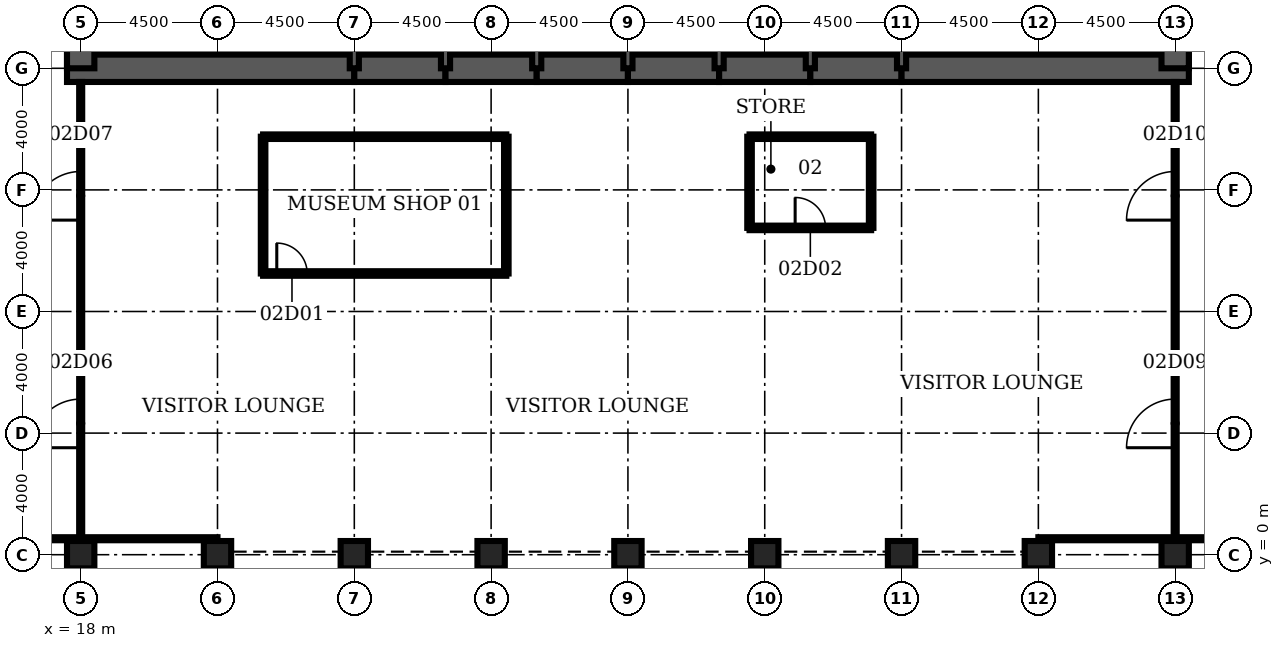
"""IFC4 building model, lengths in metres.
Left out: names, types, materials, properties, quantities, classifications, styles, units other than length and angle.
Written with IfcOpenShell. Run it as: python <this file> out.ifc"""

import sys

from ifc_helpers import new_model, si_unit, direction, frame, frame_2d, origin, origin_2d, place, context, subcontext, project, spatial, rectangle, hollow_rectangle, extrude, element, fill, save


model = new_model("IFC4")
c1 = context("Model", 3, precision=1e-05, world=origin(), true_north=direction((0.0, 1.0)))
c2 = subcontext(c1, "Body", "Model", "MODEL_VIEW")
j1 = project(units=[si_unit("LENGTHUNIT", "METRE"), si_unit("PLANEANGLEUNIT", "RADIAN")], contexts=[c1])
p1 = place(None, origin())
s1 = spatial("IfcSite", under=j1, at=p1, CompositionType="ELEMENT")
p2 = place(p1, origin())
s2 = spatial("IfcBuilding", under=s1, at=p2, CompositionType="ELEMENT")
p3 = place(p2, frame((0.0, 0.0, 13.0)))
s3 = spatial("IfcBuildingStorey", under=s2, at=p3, CompositionType="ELEMENT", Elevation=13.0)
for number, where, z_axis, x_axis in (
    (1, (18.0, 0.0, 0.0), (0.0, 0.0, 1.0), (0.0, 1.0, 0.0)),
    (2, (22.5, 0.0, 0.0), (0.0, 0.0, 1.0), (0.0, 1.0, 0.0)),
    (3, (27.0, 0.0, 0.0), (0.0, 0.0, 1.0), (0.0, 1.0, 0.0)),
    (4, (31.5, 0.0, 0.0), (0.0, 0.0, 1.0), (0.0, 1.0, 0.0)),
    (5, (36.0, 0.0, 0.0), (0.0, 0.0, 1.0), (0.0, 1.0, 0.0)),
    (6, (40.5, 0.0, 0.0), (0.0, 0.0, 1.0), (0.0, 1.0, 0.0)),
    (7, (45.0, 0.0, 0.0), (0.0, 0.0, 1.0), (0.0, 1.0, 0.0)),
    (8, (49.5, 0.0, 0.0), (0.0, 0.0, 1.0), (0.0, 1.0, 0.0)),
    (9, (54.0, 0.0, 0.0), (0.0, 0.0, 1.0), (0.0, 1.0, 0.0)),
):
    element("IfcColumn", number, at=place(p3, frame(where, z_axis=z_axis, x_axis=x_axis)), inside=s3, PredefinedType="COLUMN", context=c2, shape_type="SweptSolid", body=[
        extrude(hollow_rectangle(XDim=0.9, YDim=0.9, WallThickness=0.12, at=origin_2d()), origin(), (0.0, 0.0, 1.0), 5.0),
    ])
p4 = place(p3, frame((17.55, 16.0, 0.0), z_axis=(0.0, 0.0, 1.0), x_axis=(1.0, 0.0, 0.0)))
e10 = element("IfcWall", 10, at=p4, inside=s3, PredefinedType="SHEAR", context=c2, shape_type="SweptSolid", body=[
    extrude(rectangle(XDim=9.45, YDim=0.9, at=frame_2d((4.725, 0.0))), origin(), (0.0, 0.0, 1.0), 5.0),
])
for number, where, z_axis, x_axis in (
    (11, (27.0, 16.0, 0.0), (0.0, 0.0, 1.0), (1.0, 0.0, 0.0)),
    (12, (30.0, 16.0, 0.0), (0.0, 0.0, 1.0), (1.0, 0.0, 0.0)),
    (13, (33.0, 16.0, 0.0), (0.0, 0.0, 1.0), (1.0, 0.0, 0.0)),
    (14, (36.0, 16.0, 0.0), (0.0, 0.0, 1.0), (1.0, 0.0, 0.0)),
    (15, (39.0, 16.0, 0.0), (0.0, 0.0, 1.0), (1.0, 0.0, 0.0)),
    (16, (42.0, 16.0, 0.0), (0.0, 0.0, 1.0), (1.0, 0.0, 0.0)),
):
    element("IfcWall", number, at=place(p3, frame(where, z_axis=z_axis, x_axis=x_axis)), inside=s3, PredefinedType="SHEAR", context=c2, shape_type="SweptSolid", body=[
        extrude(rectangle(XDim=3.0, YDim=0.9, at=frame_2d((1.5, 0.0))), origin(), (0.0, 0.0, 1.0), 5.0),
    ])
p5 = place(p3, frame((45.0, 16.0, 0.0), z_axis=(0.0, 0.0, 1.0), x_axis=(1.0, 0.0, 0.0)))
e17 = element("IfcWall", 17, at=p5, inside=s3, PredefinedType="SHEAR", context=c2, shape_type="SweptSolid", body=[
    extrude(rectangle(XDim=9.45, YDim=0.9, at=frame_2d((4.725, 0.0))), origin(), (0.0, 0.0, 1.0), 5.0),
])
for number, where, z_axis, x_axis in (
    (18, (18.0, 19.2, 0.0), (0.0, 0.0, 1.0), (0.0, -1.0, 0.0)),
    (19, (54.0, 16.0, 0.0), (0.0, 0.0, 1.0), (0.0, 1.0, 0.0)),
):
    element("IfcWall", number, at=place(p3, frame(where, z_axis=z_axis, x_axis=x_axis)), inside=s3, PredefinedType="SHEAR", context=c2, shape_type="SweptSolid", body=[
        extrude(rectangle(XDim=3.2, YDim=0.9, at=frame_2d((1.6, 0.0))), origin(), (0.0, 0.0, 1.0), 5.0),
    ])
for number, where, z_axis, x_axis in (
    (20, (27.0, 16.0, 0.0), (0.0, 0.0, 1.0), (0.0, 1.0, 0.0)),
    (21, (30.0, 16.0, 0.0), (0.0, 0.0, 1.0), (0.0, 1.0, 0.0)),
    (22, (33.0, 16.0, 0.0), (0.0, 0.0, 1.0), (0.0, 1.0, 0.0)),
    (23, (36.0, 16.0, 0.0), (0.0, 0.0, 1.0), (0.0, 1.0, 0.0)),
    (24, (39.0, 16.0, 0.0), (0.0, 0.0, 1.0), (0.0, 1.0, 0.0)),
    (25, (42.0, 16.0, 0.0), (0.0, 0.0, 1.0), (0.0, 1.0, 0.0)),
    (26, (45.0, 16.0, 0.0), (0.0, 0.0, 1.0), (0.0, 1.0, 0.0)),
):
    element("IfcWall", number, at=place(p3, frame(where, z_axis=z_axis, x_axis=x_axis)), inside=s3, PredefinedType="SOLIDWALL", context=c2, shape_type="SweptSolid", body=[
        extrude(rectangle(XDim=3.2, YDim=0.3, at=frame_2d((1.6, 0.0))), origin(), (0.0, 0.0, 1.0), 5.0),
    ])
p6 = place(p3, frame((24.0, 9.25, 0.0), z_axis=(0.0, 0.0, 1.0), x_axis=(1.0, 0.0, 0.0)))
e27 = element("IfcWall", 27, at=p6, inside=s3, PredefinedType="PARTITIONING", context=c2, shape_type="SweptSolid", body=[
    extrude(rectangle(XDim=8.0, YDim=0.15, at=frame_2d((4.0, 0.0))), origin(), (0.0, 0.0, 1.0), 3.0),
])
p7 = place(p6, frame((0.45, 0.0, 0.0)))
e28 = element("IfcOpeningElement", 28, at=p7, cuts=e27, PredefinedType="OPENING", context=c2, shape_type="SweptSolid", body=[
    extrude(rectangle(XDim=1.0, YDim=2.1, at=frame_2d((0.5, 1.05))), frame((0.0, 0.085, 0.0), z_axis=(0.0, -1.0, 0.0), x_axis=(1.0, 0.0, 0.0)), (0.0, 0.0, 1.0), 0.17),
])
p8 = place(p3, frame((40.0, 10.75, 0.0), z_axis=(0.0, 0.0, 1.0), x_axis=(1.0, 0.0, 0.0)))
e29 = element("IfcWall", 29, at=p8, inside=s3, PredefinedType="PARTITIONING", context=c2, shape_type="SweptSolid", body=[
    extrude(rectangle(XDim=4.0, YDim=0.15, at=frame_2d((2.0, 0.0))), origin(), (0.0, 0.0, 1.0), 3.0),
])
p9 = place(p8, frame((1.5, 0.0, 0.0)))
e30 = element("IfcOpeningElement", 30, at=p9, cuts=e29, PredefinedType="OPENING", context=c2, shape_type="SweptSolid", body=[
    extrude(rectangle(XDim=1.0, YDim=2.1, at=frame_2d((0.5, 1.05))), frame((0.0, 0.085, 0.0), z_axis=(0.0, -1.0, 0.0), x_axis=(1.0, 0.0, 0.0)), (0.0, 0.0, 1.0), 0.17),
])
p10 = place(p3, frame((24.0, 13.75, 0.0), z_axis=(0.0, 0.0, 1.0), x_axis=(1.0, 0.0, 0.0)))
e31 = element("IfcWall", 31, at=p10, inside=s3, PredefinedType="PARTITIONING", context=c2, shape_type="SweptSolid", body=[
    extrude(rectangle(XDim=8.0, YDim=0.15, at=frame_2d((4.0, 0.0))), origin(), (0.0, 0.0, 1.0), 3.0),
])
p11 = place(p3, frame((40.0, 13.75, 0.0), z_axis=(0.0, 0.0, 1.0), x_axis=(1.0, 0.0, 0.0)))
e32 = element("IfcWall", 32, at=p11, inside=s3, PredefinedType="PARTITIONING", context=c2, shape_type="SweptSolid", body=[
    extrude(rectangle(XDim=4.0, YDim=0.15, at=frame_2d((2.0, 0.0))), origin(), (0.0, 0.0, 1.0), 3.0),
])
p12 = place(p3, frame((18.0, 0.575, 0.0), z_axis=(0.0, 0.0, 1.0), x_axis=(0.0, 1.0, 0.0)))
e33 = element("IfcWall", 33, at=p12, inside=s3, PredefinedType="PARTITIONING", context=c2, shape_type="SweptSolid", body=[
    extrude(rectangle(XDim=14.975, YDim=0.1, at=frame_2d((7.488, 0.0))), origin(), (0.0, 0.0, 1.0), 3.0),
])
p13 = place(p12, frame((2.944, 0.0, 0.0)))
e34 = element("IfcOpeningElement", 34, at=p13, cuts=e33, PredefinedType="OPENING", context=c2, shape_type="SweptSolid", body=[
    extrude(rectangle(XDim=1.6, YDim=2.1, at=frame_2d((0.8, 1.05))), frame((0.0, 0.06, 0.0), z_axis=(0.0, -1.0, 0.0), x_axis=(1.0, 0.0, 0.0)), (0.0, 0.0, 1.0), 0.12),
])
p14 = place(p12, frame((10.431, 0.0, 0.0)))
e35 = element("IfcOpeningElement", 35, at=p14, cuts=e33, PredefinedType="OPENING", context=c2, shape_type="SweptSolid", body=[
    extrude(rectangle(XDim=1.6, YDim=2.1, at=frame_2d((0.8, 1.05))), frame((0.0, 0.06, 0.0), z_axis=(0.0, -1.0, 0.0), x_axis=(1.0, 0.0, 0.0)), (0.0, 0.0, 1.0), 0.12),
])
for number, where, z_axis, x_axis in (
    (36, (24.0, 9.25, 0.0), (0.0, 0.0, 1.0), (0.0, 1.0, 0.0)),
    (37, (32.0, 9.25, 0.0), (0.0, 0.0, 1.0), (0.0, 1.0, 0.0)),
):
    element("IfcWall", number, at=place(p3, frame(where, z_axis=z_axis, x_axis=x_axis)), inside=s3, PredefinedType="PARTITIONING", context=c2, shape_type="SweptSolid", body=[
        extrude(rectangle(XDim=4.5, YDim=0.15, at=frame_2d((2.25, 0.0))), origin(), (0.0, 0.0, 1.0), 3.0),
    ])
for number, where, z_axis, x_axis in (
    (38, (40.0, 10.75, 0.0), (0.0, 0.0, 1.0), (0.0, 1.0, 0.0)),
    (39, (44.0, 10.75, 0.0), (0.0, 0.0, 1.0), (0.0, 1.0, 0.0)),
):
    element("IfcWall", number, at=place(p3, frame(where, z_axis=z_axis, x_axis=x_axis)), inside=s3, PredefinedType="PARTITIONING", context=c2, shape_type="SweptSolid", body=[
        extrude(rectangle(XDim=3.0, YDim=0.15, at=frame_2d((1.5, 0.0))), origin(), (0.0, 0.0, 1.0), 3.0),
    ])
p15 = place(p3, frame((54.0, 0.575, 0.0), z_axis=(0.0, 0.0, 1.0), x_axis=(0.0, 1.0, 0.0)))
e40 = element("IfcWall", 40, at=p15, inside=s3, PredefinedType="PARTITIONING", context=c2, shape_type="SweptSolid", body=[
    extrude(rectangle(XDim=14.975, YDim=0.1, at=frame_2d((7.488, 0.0))), origin(), (0.0, 0.0, 1.0), 3.0),
])
p16 = place(p15, frame((2.944, 0.0, 0.0)))
e41 = element("IfcOpeningElement", 41, at=p16, cuts=e40, PredefinedType="OPENING", context=c2, shape_type="SweptSolid", body=[
    extrude(rectangle(XDim=1.6, YDim=2.1, at=frame_2d((0.8, 1.05))), frame((0.0, 0.06, 0.0), z_axis=(0.0, -1.0, 0.0), x_axis=(1.0, 0.0, 0.0)), (0.0, 0.0, 1.0), 0.12),
])
p17 = place(p15, frame((10.431, 0.0, 0.0)))
e42 = element("IfcOpeningElement", 42, at=p17, cuts=e40, PredefinedType="OPENING", context=c2, shape_type="SweptSolid", body=[
    extrude(rectangle(XDim=1.6, YDim=2.1, at=frame_2d((0.8, 1.05))), frame((0.0, 0.06, 0.0), z_axis=(0.0, -1.0, 0.0), x_axis=(1.0, 0.0, 0.0)), (0.0, 0.0, 1.0), 0.12),
])
p18 = place(p3, frame((4.3, 0.525, 0.0), z_axis=(0.0, 0.0, 1.0), x_axis=(1.0, 0.0, 0.0)))
e43 = element("IfcWall", 43, at=p18, inside=s3, PredefinedType="PARTITIONING", context=c2, shape_type="SweptSolid", body=[
    extrude(rectangle(XDim=18.2, YDim=0.1, at=frame_2d((9.1, 0.0))), origin(), (0.0, 0.0, 1.0), 3.0),
])
p19 = place(p18, frame((6.15, 0.0, 0.0)))
e44 = element("IfcOpeningElement", 44, at=p19, cuts=e43, PredefinedType="OPENING", context=c2, shape_type="SweptSolid", body=[
    extrude(rectangle(XDim=1.6, YDim=2.1, at=frame_2d((0.8, 1.05))), frame((0.0, 0.06, 0.0), z_axis=(0.0, -1.0, 0.0), x_axis=(1.0, 0.0, 0.0)), (0.0, 0.0, 1.0), 0.12),
])
p20 = place(p3, frame((49.5, 0.525, 0.0), z_axis=(0.0, 0.0, 1.0), x_axis=(1.0, 0.0, 0.0)))
e45 = element("IfcWall", 45, at=p20, inside=s3, PredefinedType="PARTITIONING", context=c2, shape_type="SweptSolid", body=[
    extrude(rectangle(XDim=18.2, YDim=0.1, at=frame_2d((9.1, 0.0))), origin(), (0.0, 0.0, 1.0), 3.0),
])
p21 = place(p20, frame((10.45, 0.0, 0.0)))
e46 = element("IfcOpeningElement", 46, at=p21, cuts=e45, PredefinedType="OPENING", context=c2, shape_type="SweptSolid", body=[
    extrude(rectangle(XDim=1.6, YDim=2.1, at=frame_2d((0.8, 1.05))), frame((0.0, 0.06, 0.0), z_axis=(0.0, -1.0, 0.0), x_axis=(1.0, 0.0, 0.0)), (0.0, 0.0, 1.0), 0.12),
])
p22 = place(p7, origin())
e47 = element("IfcDoor", 47, at=p22, inside=s3, OperationType="SINGLE_SWING_LEFT", PredefinedType="DOOR", context=c2, shape_type="SweptSolid", body=[
    extrude(rectangle(XDim=1.0, YDim=2.1, at=frame_2d((0.5, 1.05))), frame((0.0, 0.025, 0.0), z_axis=(0.0, -1.0, 0.0), x_axis=(1.0, 0.0, 0.0)), (0.0, 0.0, 1.0), 0.05),
])
fill(e28, e47)
p23 = place(p9, origin())
e48 = element("IfcDoor", 48, at=p23, inside=s3, OperationType="SINGLE_SWING_LEFT", PredefinedType="DOOR", context=c2, shape_type="SweptSolid", body=[
    extrude(rectangle(XDim=1.0, YDim=2.1, at=frame_2d((0.5, 1.05))), frame((0.0, 0.025, 0.0), z_axis=(0.0, -1.0, 0.0), x_axis=(1.0, 0.0, 0.0)), (0.0, 0.0, 1.0), 0.05),
])
fill(e30, e48)
p24 = place(p13, origin())
e49 = element("IfcDoor", 49, at=p24, inside=s3, OperationType="SINGLE_SWING_LEFT", PredefinedType="DOOR", context=c2, shape_type="SweptSolid", body=[
    extrude(rectangle(XDim=1.6, YDim=2.1, at=frame_2d((0.8, 1.05))), frame((0.0, 0.025, 0.0), z_axis=(0.0, -1.0, 0.0), x_axis=(1.0, 0.0, 0.0)), (0.0, 0.0, 1.0), 0.05),
])
fill(e34, e49)
p25 = place(p14, origin())
e50 = element("IfcDoor", 50, at=p25, inside=s3, OperationType="SINGLE_SWING_LEFT", PredefinedType="DOOR", context=c2, shape_type="SweptSolid", body=[
    extrude(rectangle(XDim=1.6, YDim=2.1, at=frame_2d((0.8, 1.05))), frame((0.0, 0.025, 0.0), z_axis=(0.0, -1.0, 0.0), x_axis=(1.0, 0.0, 0.0)), (0.0, 0.0, 1.0), 0.05),
])
fill(e35, e50)
p26 = place(p16, origin())
e51 = element("IfcDoor", 51, at=p26, inside=s3, OperationType="SINGLE_SWING_LEFT", PredefinedType="DOOR", context=c2, shape_type="SweptSolid", body=[
    extrude(rectangle(XDim=1.6, YDim=2.1, at=frame_2d((0.8, 1.05))), frame((0.0, 0.025, 0.0), z_axis=(0.0, -1.0, 0.0), x_axis=(1.0, 0.0, 0.0)), (0.0, 0.0, 1.0), 0.05),
])
fill(e41, e51)
p27 = place(p17, origin())
e52 = element("IfcDoor", 52, at=p27, inside=s3, OperationType="SINGLE_SWING_LEFT", PredefinedType="DOOR", context=c2, shape_type="SweptSolid", body=[
    extrude(rectangle(XDim=1.6, YDim=2.1, at=frame_2d((0.8, 1.05))), frame((0.0, 0.025, 0.0), z_axis=(0.0, -1.0, 0.0), x_axis=(1.0, 0.0, 0.0)), (0.0, 0.0, 1.0), 0.05),
])
fill(e42, e52)
save(model, sys.argv[1])
